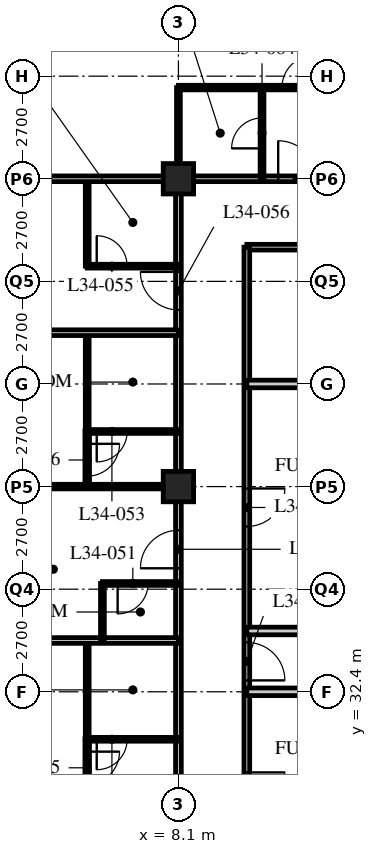
"""IFC4 building model, lengths in metres.
Left out: names, types, materials, properties, quantities, classifications, styles, units other than length and angle.
Written with IfcOpenShell. Run it as: python <this file> out.ifc"""

import sys

from ifc_helpers import new_model, si_unit, direction, frame, frame_2d, origin, origin_2d, place, context, subcontext, project, spatial, rectangle, hollow_rectangle, extrude, element, fill, save


model = new_model("IFC4")
c1 = context("Model", 3, precision=1e-05, world=origin(), true_north=direction((0.0, 1.0)))
c2 = subcontext(c1, "Body", "Model", "MODEL_VIEW")
j1 = project(units=[si_unit("LENGTHUNIT", "METRE"), si_unit("PLANEANGLEUNIT", "RADIAN")], contexts=[c1])
p1 = place(None, origin())
s1 = spatial("IfcSite", under=j1, at=p1, CompositionType="ELEMENT")
p2 = place(p1, origin())
s2 = spatial("IfcBuilding", under=s1, at=p2, CompositionType="ELEMENT")
p3 = place(p2, frame((0.0, 0.0, 134.0)))
s3 = spatial("IfcBuildingStorey", under=s2, at=p3, CompositionType="ELEMENT", Elevation=134.0)
for number, where, z_axis, x_axis in (
    (1, (8.1, 37.8, 0.0), (0.0, 0.0, 1.0), (1.0, 0.0, 0.0)),
    (2, (8.1, 45.9, 0.0), (0.0, 0.0, 1.0), (1.0, 0.0, 0.0)),
):
    element("IfcColumn", number, at=place(p3, frame(where, z_axis=z_axis, x_axis=x_axis)), inside=s3, PredefinedType="COLUMN", context=c2, shape_type="SweptSolid", body=[
        extrude(hollow_rectangle(XDim=0.8, YDim=0.8, WallThickness=0.08, at=origin_2d()), origin(), (0.0, 0.0, 1.0), 3.4),
    ])
p4 = place(p3, frame((8.1, 45.9, 0.0), z_axis=(0.0, 0.0, 1.0), x_axis=(1.0, 0.0, 0.0)))
e3 = element("IfcWall", 3, at=p4, inside=s3, PredefinedType="PARTITIONING", context=c2, shape_type="SweptSolid", body=[
    extrude(rectangle(XDim=36.45, YDim=0.15, at=frame_2d((18.225, 0.0))), origin(), (0.0, 0.0, 1.0), 2.578),
])
p5 = place(p4, frame((9.625, 0.0, 0.0)))
e4 = element("IfcOpeningElement", 4, at=p5, cuts=e3, PredefinedType="OPENING", context=c2, shape_type="SweptSolid", body=[
    extrude(rectangle(XDim=1.0, YDim=2.1, at=frame_2d((0.5, 1.05))), frame((0.0, 0.085, 0.0), z_axis=(0.0, -1.0, 0.0), x_axis=(1.0, 0.0, 0.0)), (0.0, 0.0, 1.0), 0.17),
])
p6 = place(p4, frame((21.775, 0.0, 0.0)))
e5 = element("IfcOpeningElement", 5, at=p6, cuts=e3, PredefinedType="OPENING", context=c2, shape_type="SweptSolid", body=[
    extrude(rectangle(XDim=1.0, YDim=2.1, at=frame_2d((0.5, 1.05))), frame((0.0, 0.085, 0.0), z_axis=(0.0, -1.0, 0.0), x_axis=(1.0, 0.0, 0.0)), (0.0, 0.0, 1.0), 0.17),
])
p7 = place(p4, frame((28.95, 0.0, 0.0)))
e6 = element("IfcOpeningElement", 6, at=p7, cuts=e3, PredefinedType="OPENING", context=c2, shape_type="SweptSolid", body=[
    extrude(rectangle(XDim=1.0, YDim=2.1, at=frame_2d((0.5, 1.05))), frame((0.0, 0.085, 0.0), z_axis=(0.0, -1.0, 0.0), x_axis=(1.0, 0.0, 0.0)), (0.0, 0.0, 1.0), 0.17),
])
p8 = place(p4, frame((33.925, 0.0, 0.0)))
e7 = element("IfcOpeningElement", 7, at=p8, cuts=e3, PredefinedType="OPENING", context=c2, shape_type="SweptSolid", body=[
    extrude(rectangle(XDim=1.0, YDim=2.1, at=frame_2d((0.5, 1.05))), frame((0.0, 0.085, 0.0), z_axis=(0.0, -1.0, 0.0), x_axis=(1.0, 0.0, 0.0)), (0.0, 0.0, 1.0), 0.17),
])
p9 = place(p4, frame((2.625, 0.0, 0.0)))
e8 = element("IfcOpeningElement", 8, at=p9, cuts=e3, PredefinedType="OPENING", context=c2, shape_type="SweptSolid", body=[
    extrude(rectangle(XDim=1.0, YDim=2.1, at=frame_2d((0.5, 1.05))), frame((0.0, 0.085, 0.0), z_axis=(0.0, -1.0, 0.0), x_axis=(1.0, 0.0, 0.0)), (0.0, 0.0, 1.0), 0.17),
])
p10 = place(p3, frame((8.1, 17.55, 0.0), z_axis=(0.0, 0.0, 1.0), x_axis=(0.0, 1.0, 0.0)))
e9 = element("IfcWall", 9, at=p10, inside=s3, PredefinedType="PARTITIONING", context=c2, shape_type="SweptSolid", body=[
    extrude(rectangle(XDim=28.35, YDim=0.15, at=frame_2d((14.175, 0.0))), origin(), (0.0, 0.0, 1.0), 2.578),
])
p11 = place(p10, frame((1.9, 0.0, 0.0)))
e10 = element("IfcOpeningElement", 10, at=p11, cuts=e9, PredefinedType="OPENING", context=c2, shape_type="SweptSolid", body=[
    extrude(rectangle(XDim=1.0, YDim=2.1, at=frame_2d((0.5, 1.05))), frame((0.0, 0.085, 0.0), z_axis=(0.0, -1.0, 0.0), x_axis=(1.0, 0.0, 0.0)), (0.0, 0.0, 1.0), 0.17),
])
p12 = place(p10, frame((10.0, 0.0, 0.0)))
e11 = element("IfcOpeningElement", 11, at=p12, cuts=e9, PredefinedType="OPENING", context=c2, shape_type="SweptSolid", body=[
    extrude(rectangle(XDim=1.0, YDim=2.1, at=frame_2d((0.5, 1.05))), frame((0.0, 0.085, 0.0), z_axis=(0.0, -1.0, 0.0), x_axis=(1.0, 0.0, 0.0)), (0.0, 0.0, 1.0), 0.17),
])
p13 = place(p10, frame((18.1, 0.0, 0.0)))
e12 = element("IfcOpeningElement", 12, at=p13, cuts=e9, PredefinedType="OPENING", context=c2, shape_type="SweptSolid", body=[
    extrude(rectangle(XDim=1.0, YDim=2.1, at=frame_2d((0.5, 1.05))), frame((0.0, 0.085, 0.0), z_axis=(0.0, -1.0, 0.0), x_axis=(1.0, 0.0, 0.0)), (0.0, 0.0, 1.0), 0.17),
])
p14 = place(p10, frame((24.9, 0.0, 0.0)))
e13 = element("IfcOpeningElement", 13, at=p14, cuts=e9, PredefinedType="OPENING", context=c2, shape_type="SweptSolid", body=[
    extrude(rectangle(XDim=1.0, YDim=2.1, at=frame_2d((0.5, 1.05))), frame((0.0, 0.085, 0.0), z_axis=(0.0, -1.0, 0.0), x_axis=(1.0, 0.0, 0.0)), (0.0, 0.0, 1.0), 0.17),
])
p15 = place(p3, frame((27.14, 44.1, 0.0), z_axis=(0.0, 0.0, 1.0), x_axis=(-1.0, 0.0, 0.0)))
e14 = element("IfcWall", 14, at=p15, inside=s3, PredefinedType="PARTITIONING", context=c2, shape_type="SweptSolid", body=[
    extrude(rectangle(XDim=17.24, YDim=0.15, at=frame_2d((8.62, 0.0))), origin(), (0.0, 0.0, 1.0), 3.19),
])
p16 = place(p15, frame((13.59, 0.0, 0.0)))
e15 = element("IfcOpeningElement", 15, at=p16, cuts=e14, PredefinedType="OPENING", context=c2, shape_type="SweptSolid", body=[
    extrude(rectangle(XDim=1.0, YDim=2.1, at=frame_2d((0.5, 1.05))), frame((0.0, 0.085, 0.0), z_axis=(0.0, -1.0, 0.0), x_axis=(1.0, 0.0, 0.0)), (0.0, 0.0, 1.0), 0.17),
])
p17 = place(p15, frame((9.051, 0.0, 0.0)))
e16 = element("IfcOpeningElement", 16, at=p17, cuts=e14, PredefinedType="OPENING", context=c2, shape_type="SweptSolid", body=[
    extrude(rectangle(XDim=1.0, YDim=2.1, at=frame_2d((0.5, 1.05))), frame((0.0, 0.085, 0.0), z_axis=(0.0, -1.0, 0.0), x_axis=(1.0, 0.0, 0.0)), (0.0, 0.0, 1.0), 0.17),
])
p18 = place(p15, frame((3.576, 0.0, 0.0)))
e17 = element("IfcOpeningElement", 17, at=p18, cuts=e14, PredefinedType="OPENING", context=c2, shape_type="SweptSolid", body=[
    extrude(rectangle(XDim=1.0, YDim=2.1, at=frame_2d((0.5, 1.05))), frame((0.0, 0.085, 0.0), z_axis=(0.0, -1.0, 0.0), x_axis=(1.0, 0.0, 0.0)), (0.0, 0.0, 1.0), 0.17),
])
p19 = place(p3, frame((9.9, 44.1, 0.0), z_axis=(0.0, 0.0, 1.0), x_axis=(0.0, -1.0, 0.0)))
e18 = element("IfcWall", 18, at=p19, inside=s3, PredefinedType="PARTITIONING", context=c2, shape_type="SweptSolid", body=[
    extrude(rectangle(XDim=24.75, YDim=0.15, at=frame_2d((12.375, 0.0))), origin(), (0.0, 0.0, 1.0), 3.19),
])
p20 = place(p19, frame((17.871, 0.0, 0.0)))
e19 = element("IfcOpeningElement", 19, at=p20, cuts=e18, PredefinedType="OPENING", context=c2, shape_type="SweptSolid", body=[
    extrude(rectangle(XDim=1.0, YDim=2.1, at=frame_2d((0.5, 1.05))), frame((0.0, 0.085, 0.0), z_axis=(0.0, -1.0, 0.0), x_axis=(1.0, 0.0, 0.0)), (0.0, 0.0, 1.0), 0.17),
])
p21 = place(p19, frame((13.821, 0.0, 0.0)))
e20 = element("IfcOpeningElement", 20, at=p21, cuts=e18, PredefinedType="OPENING", context=c2, shape_type="SweptSolid", body=[
    extrude(rectangle(XDim=1.0, YDim=2.1, at=frame_2d((0.5, 1.05))), frame((0.0, 0.085, 0.0), z_axis=(0.0, -1.0, 0.0), x_axis=(1.0, 0.0, 0.0)), (0.0, 0.0, 1.0), 0.17),
])
p22 = place(p19, frame((10.4, 0.0, 0.0)))
e21 = element("IfcOpeningElement", 21, at=p22, cuts=e18, PredefinedType="OPENING", context=c2, shape_type="SweptSolid", body=[
    extrude(rectangle(XDim=1.0, YDim=2.1, at=frame_2d((0.5, 1.05))), frame((0.0, 0.085, 0.0), z_axis=(0.0, -1.0, 0.0), x_axis=(1.0, 0.0, 0.0)), (0.0, 0.0, 1.0), 0.17),
])
p23 = place(p19, frame((6.35, 0.0, 0.0)))
e22 = element("IfcOpeningElement", 22, at=p23, cuts=e18, PredefinedType="OPENING", context=c2, shape_type="SweptSolid", body=[
    extrude(rectangle(XDim=1.0, YDim=2.1, at=frame_2d((0.5, 1.05))), frame((0.0, 0.085, 0.0), z_axis=(0.0, -1.0, 0.0), x_axis=(1.0, 0.0, 0.0)), (0.0, 0.0, 1.0), 0.17),
])
for number, where, z_axis, x_axis in (
    (23, (9.9, 32.4, 0.0), (0.0, 0.0, 1.0), (1.0, 0.0, 0.0)),
    (24, (9.9, 34.0, 0.0), (0.0, 0.0, 1.0), (1.0, 0.0, 0.0)),
    (25, (9.9, 40.5, 0.0), (0.0, 0.0, 1.0), (1.0, 0.0, 0.0)),
):
    element("IfcWall", number, at=place(p3, frame(where, z_axis=z_axis, x_axis=x_axis)), inside=s3, PredefinedType="SOLIDWALL", context=c2, shape_type="SweptSolid", body=[
        extrude(rectangle(XDim=6.3, YDim=0.2, at=frame_2d((3.15, 0.0))), origin(), (0.0, 0.0, 1.0), 3.19),
    ])
p24 = place(p3, frame((5.7, 31.15, 0.0), z_axis=(0.0, 0.0, 1.0), x_axis=(0.0, 1.0, 0.0)))
e26 = element("IfcWall", 26, at=p24, inside=s3, PredefinedType="PARTITIONING", context=c2, shape_type="SweptSolid", body=[
    extrude(rectangle(XDim=2.6, YDim=0.1, at=frame_2d((1.3, 0.0))), origin(), (0.0, 0.0, 1.0), 3.19),
])
p25 = place(p3, frame((8.1, 31.15, 0.0), z_axis=(0.0, 0.0, 1.0), x_axis=(-1.0, 0.0, 0.0)))
e27 = element("IfcWall", 27, at=p25, inside=s3, PredefinedType="PARTITIONING", context=c2, shape_type="SweptSolid", body=[
    extrude(rectangle(XDim=2.4, YDim=0.1, at=frame_2d((1.2, 0.0))), origin(), (0.0, 0.0, 1.0), 3.19),
])
p26 = place(p25, frame((1.35, 0.0, 0.0)))
e28 = element("IfcOpeningElement", 28, at=p26, cuts=e27, PredefinedType="OPENING", context=c2, shape_type="SweptSolid", body=[
    extrude(rectangle(XDim=0.8, YDim=2.1, at=frame_2d((0.4, 1.05))), frame((0.0, 0.06, 0.0), z_axis=(0.0, -1.0, 0.0), x_axis=(1.0, 0.0, 0.0)), (0.0, 0.0, 1.0), 0.12),
])
p27 = place(p3, frame((8.1, 33.75, 0.0), z_axis=(0.0, 0.0, 1.0), x_axis=(-1.0, 0.0, 0.0)))
e29 = element("IfcWall", 29, at=p27, inside=s3, PredefinedType="PARTITIONING", context=c2, shape_type="SweptSolid", body=[
    extrude(rectangle(XDim=7.8, YDim=0.15, at=frame_2d((3.9, 0.0))), origin(), (0.0, 0.0, 1.0), 3.19),
])
p28 = place(p3, frame((6.1, 33.75, 0.0), z_axis=(0.0, 0.0, 1.0), x_axis=(0.0, 1.0, 0.0)))
e30 = element("IfcWall", 30, at=p28, inside=s3, PredefinedType="PARTITIONING", context=c2, shape_type="SweptSolid", body=[
    extrude(rectangle(XDim=1.5, YDim=0.1, at=frame_2d((0.75, 0.0))), origin(), (0.0, 0.0, 1.0), 3.19),
])
p29 = place(p3, frame((8.1, 35.25, 0.0), z_axis=(0.0, 0.0, 1.0), x_axis=(-1.0, 0.0, 0.0)))
e31 = element("IfcWall", 31, at=p29, inside=s3, PredefinedType="PARTITIONING", context=c2, shape_type="SweptSolid", body=[
    extrude(rectangle(XDim=2.0, YDim=0.1, at=frame_2d((1.0, 0.0))), origin(), (0.0, 0.0, 1.0), 3.19),
])
p30 = place(p29, frame((0.8, 0.0, 0.0)))
e32 = element("IfcOpeningElement", 32, at=p30, cuts=e31, PredefinedType="OPENING", context=c2, shape_type="SweptSolid", body=[
    extrude(rectangle(XDim=0.8, YDim=2.1, at=frame_2d((0.4, 1.05))), frame((0.0, 0.06, 0.0), z_axis=(0.0, -1.0, 0.0), x_axis=(1.0, 0.0, 0.0)), (0.0, 0.0, 1.0), 0.12),
])
p31 = place(p3, frame((5.7, 39.25, 0.0), z_axis=(0.0, 0.0, 1.0), x_axis=(0.0, 1.0, 0.0)))
e33 = element("IfcWall", 33, at=p31, inside=s3, PredefinedType="PARTITIONING", context=c2, shape_type="SweptSolid", body=[
    extrude(rectangle(XDim=2.6, YDim=0.1, at=frame_2d((1.3, 0.0))), origin(), (0.0, 0.0, 1.0), 3.19),
])
p32 = place(p3, frame((8.1, 39.25, 0.0), z_axis=(0.0, 0.0, 1.0), x_axis=(-1.0, 0.0, 0.0)))
e34 = element("IfcWall", 34, at=p32, inside=s3, PredefinedType="PARTITIONING", context=c2, shape_type="SweptSolid", body=[
    extrude(rectangle(XDim=2.4, YDim=0.1, at=frame_2d((1.2, 0.0))), origin(), (0.0, 0.0, 1.0), 3.19),
])
p33 = place(p32, frame((1.35, 0.0, 0.0)))
e35 = element("IfcOpeningElement", 35, at=p33, cuts=e34, PredefinedType="OPENING", context=c2, shape_type="SweptSolid", body=[
    extrude(rectangle(XDim=0.8, YDim=2.1, at=frame_2d((0.4, 1.05))), frame((0.0, 0.06, 0.0), z_axis=(0.0, -1.0, 0.0), x_axis=(1.0, 0.0, 0.0)), (0.0, 0.0, 1.0), 0.12),
])
p34 = place(p3, frame((8.1, 37.8, 0.0), z_axis=(0.0, 0.0, 1.0), x_axis=(-1.0, 0.0, 0.0)))
e36 = element("IfcWall", 36, at=p34, inside=s3, PredefinedType="PARTITIONING", context=c2, shape_type="SweptSolid", body=[
    extrude(rectangle(XDim=7.8, YDim=0.12, at=frame_2d((3.9, 0.0))), origin(), (0.0, 0.0, 1.0), 2.578),
])
p35 = place(p34, frame((4.825, 0.0, 0.0)))
e37 = element("IfcOpeningElement", 37, at=p35, cuts=e36, PredefinedType="OPENING", context=c2, shape_type="SweptSolid", body=[
    extrude(rectangle(XDim=0.85, YDim=2.1, at=frame_2d((0.425, 1.05))), frame((0.0, 0.07, 0.0), z_axis=(0.0, -1.0, 0.0), x_axis=(1.0, 0.0, 0.0)), (0.0, 0.0, 1.0), 0.14),
])
p36 = place(p3, frame((8.1, 41.85, 0.0), z_axis=(0.0, 0.0, 1.0), x_axis=(-1.0, 0.0, 0.0)))
e38 = element("IfcWall", 38, at=p36, inside=s3, PredefinedType="PARTITIONING", context=c2, shape_type="SweptSolid", body=[
    extrude(rectangle(XDim=7.8, YDim=0.15, at=frame_2d((3.9, 0.0))), origin(), (0.0, 0.0, 1.0), 3.19),
])
p37 = place(p3, frame((5.7, 43.6, 0.0), z_axis=(0.0, 0.0, 1.0), x_axis=(0.0, 1.0, 0.0)))
e39 = element("IfcWall", 39, at=p37, inside=s3, PredefinedType="PARTITIONING", context=c2, shape_type="SweptSolid", body=[
    extrude(rectangle(XDim=2.3, YDim=0.1, at=frame_2d((1.15, 0.0))), origin(), (0.0, 0.0, 1.0), 3.19),
])
p38 = place(p3, frame((8.1, 43.6, 0.0), z_axis=(0.0, 0.0, 1.0), x_axis=(-1.0, 0.0, 0.0)))
e40 = element("IfcWall", 40, at=p38, inside=s3, PredefinedType="PARTITIONING", context=c2, shape_type="SweptSolid", body=[
    extrude(rectangle(XDim=2.4, YDim=0.1, at=frame_2d((1.2, 0.0))), origin(), (0.0, 0.0, 1.0), 3.19),
])
p39 = place(p38, frame((1.35, 0.0, 0.0)))
e41 = element("IfcOpeningElement", 41, at=p39, cuts=e40, PredefinedType="OPENING", context=c2, shape_type="SweptSolid", body=[
    extrude(rectangle(XDim=0.8, YDim=2.1, at=frame_2d((0.4, 1.05))), frame((0.0, 0.06, 0.0), z_axis=(0.0, -1.0, 0.0), x_axis=(1.0, 0.0, 0.0)), (0.0, 0.0, 1.0), 0.12),
])
p40 = place(p3, frame((8.1, 48.3, 0.0), z_axis=(0.0, 0.0, 1.0), x_axis=(1.0, 0.0, 0.0)))
e42 = element("IfcWall", 42, at=p40, inside=s3, PredefinedType="PARTITIONING", context=c2, shape_type="SweptSolid", body=[
    extrude(rectangle(XDim=4.05, YDim=0.12, at=frame_2d((2.025, 0.0))), origin(), (0.0, 0.0, 1.0), 3.19),
])
p41 = place(p40, frame((2.725, 0.0, 0.0)))
e43 = element("IfcOpeningElement", 43, at=p41, cuts=e42, PredefinedType="OPENING", context=c2, shape_type="SweptSolid", body=[
    extrude(rectangle(XDim=0.85, YDim=2.1, at=frame_2d((0.425, 1.05))), frame((0.0, 0.07, 0.0), z_axis=(0.0, -1.0, 0.0), x_axis=(1.0, 0.0, 0.0)), (0.0, 0.0, 1.0), 0.14),
])
p42 = place(p3, frame((10.3, 45.9, 0.0), z_axis=(0.0, 0.0, 1.0), x_axis=(0.0, 1.0, 0.0)))
e44 = element("IfcWall", 44, at=p42, inside=s3, PredefinedType="PARTITIONING", context=c2, shape_type="SweptSolid", body=[
    extrude(rectangle(XDim=2.4, YDim=0.1, at=frame_2d((1.2, 0.0))), origin(), (0.0, 0.0, 1.0), 3.19),
])
p43 = place(p42, frame((0.8, 0.0, 0.0)))
e45 = element("IfcOpeningElement", 45, at=p43, cuts=e44, PredefinedType="OPENING", context=c2, shape_type="SweptSolid", body=[
    extrude(rectangle(XDim=0.8, YDim=2.1, at=frame_2d((0.4, 1.05))), frame((0.0, 0.06, 0.0), z_axis=(0.0, -1.0, 0.0), x_axis=(1.0, 0.0, 0.0)), (0.0, 0.0, 1.0), 0.12),
])
p44 = place(p3, frame((8.1, 45.9, 0.0), z_axis=(0.0, 0.0, 1.0), x_axis=(0.0, 1.0, 0.0)))
e46 = element("IfcWall", 46, at=p44, inside=s3, PredefinedType="PARTITIONING", context=c2, shape_type="SweptSolid", body=[
    extrude(rectangle(XDim=2.4, YDim=0.1, at=frame_2d((1.2, 0.0))), origin(), (0.0, 0.0, 1.0), 2.578),
])
p45 = place(p3, frame((4.35, 45.9, 0.0), z_axis=(0.0, 0.0, 1.0), x_axis=(1.0, 0.0, 0.0)))
e47 = element("IfcWall", 47, at=p45, inside=s3, PredefinedType="PARTITIONING", context=c2, shape_type="SweptSolid", body=[
    extrude(rectangle(XDim=3.75, YDim=0.15, at=frame_2d((1.875, 0.0))), origin(), (0.0, 0.0, 1.0), 2.578),
])
p46 = place(p3, frame((5.7, 29.7, 0.0), z_axis=(0.0, 0.0, 1.0), x_axis=(0.0, 1.0, 0.0)))
e48 = element("IfcWall", 48, at=p46, inside=s3, PredefinedType="PARTITIONING", context=c2, shape_type="SweptSolid", body=[
    extrude(rectangle(XDim=1.46, YDim=0.12, at=frame_2d((0.73, 0.0))), origin(), (0.0, 0.0, 1.0), 3.19),
])
p47 = place(p46, frame((0.275, 0.0, 0.0)))
e49 = element("IfcOpeningElement", 49, at=p47, cuts=e48, PredefinedType="OPENING", context=c2, shape_type="SweptSolid", body=[
    extrude(rectangle(XDim=0.85, YDim=2.1, at=frame_2d((0.425, 1.05))), frame((0.0, 0.07, 0.0), z_axis=(0.0, -1.0, 0.0), x_axis=(1.0, 0.0, 0.0)), (0.0, 0.0, 1.0), 0.14),
])
p48 = place(p3, frame((5.7, 37.8, 0.0), z_axis=(0.0, 0.0, 1.0), x_axis=(0.0, 1.0, 0.0)))
e50 = element("IfcWall", 50, at=p48, inside=s3, PredefinedType="PARTITIONING", context=c2, shape_type="SweptSolid", body=[
    extrude(rectangle(XDim=1.46, YDim=0.12, at=frame_2d((0.73, 0.0))), origin(), (0.0, 0.0, 1.0), 3.19),
])
p49 = place(p48, frame((0.275, 0.0, 0.0)))
e51 = element("IfcOpeningElement", 51, at=p49, cuts=e50, PredefinedType="OPENING", context=c2, shape_type="SweptSolid", body=[
    extrude(rectangle(XDim=0.85, YDim=2.1, at=frame_2d((0.425, 1.05))), frame((0.0, 0.07, 0.0), z_axis=(0.0, -1.0, 0.0), x_axis=(1.0, 0.0, 0.0)), (0.0, 0.0, 1.0), 0.14),
])
p50 = place(p21, origin())
e52 = element("IfcDoor", 52, at=p50, inside=s3, OperationType="SINGLE_SWING_LEFT", PredefinedType="DOOR", context=c2, shape_type="SweptSolid", body=[
    extrude(rectangle(XDim=1.0, YDim=2.1, at=frame_2d((0.5, 1.05))), frame((0.0, 0.025, 0.0), z_axis=(0.0, -1.0, 0.0), x_axis=(1.0, 0.0, 0.0)), (0.0, 0.0, 1.0), 0.05),
])
fill(e20, e52)
p51 = place(p22, origin())
e53 = element("IfcDoor", 53, at=p51, inside=s3, OperationType="SINGLE_SWING_RIGHT", PredefinedType="DOOR", context=c2, shape_type="SweptSolid", body=[
    extrude(rectangle(XDim=1.0, YDim=2.1, at=frame_2d((0.5, 1.05))), frame((0.0, 0.025, 0.0), z_axis=(0.0, -1.0, 0.0), x_axis=(1.0, 0.0, 0.0)), (0.0, 0.0, 1.0), 0.05),
])
fill(e21, e53)
p52 = place(p23, origin())
e54 = element("IfcDoor", 54, at=p52, inside=s3, OperationType="SINGLE_SWING_LEFT", PredefinedType="DOOR", context=c2, shape_type="SweptSolid", body=[
    extrude(rectangle(XDim=1.0, YDim=2.1, at=frame_2d((0.5, 1.05))), frame((0.0, 0.025, 0.0), z_axis=(0.0, -1.0, 0.0), x_axis=(1.0, 0.0, 0.0)), (0.0, 0.0, 1.0), 0.05),
])
fill(e22, e54)
p53 = place(p26, origin())
e55 = element("IfcDoor", 55, at=p53, inside=s3, OperationType="SINGLE_SWING_RIGHT", PredefinedType="DOOR", context=c2, shape_type="SweptSolid", body=[
    extrude(rectangle(XDim=0.8, YDim=2.1, at=frame_2d((0.4, 1.05))), frame((0.0, 0.025, 0.0), z_axis=(0.0, -1.0, 0.0), x_axis=(1.0, 0.0, 0.0)), (0.0, 0.0, 1.0), 0.05),
])
fill(e28, e55)
p54 = place(p30, origin())
e56 = element("IfcDoor", 56, at=p54, inside=s3, OperationType="SINGLE_SWING_RIGHT", PredefinedType="DOOR", context=c2, shape_type="SweptSolid", body=[
    extrude(rectangle(XDim=0.8, YDim=2.1, at=frame_2d((0.4, 1.05))), frame((0.0, 0.025, 0.0), z_axis=(0.0, -1.0, 0.0), x_axis=(1.0, 0.0, 0.0)), (0.0, 0.0, 1.0), 0.05),
])
fill(e32, e56)
p55 = place(p13, origin())
e57 = element("IfcDoor", 57, at=p55, inside=s3, OperationType="SINGLE_SWING_LEFT", PredefinedType="DOOR", context=c2, shape_type="SweptSolid", body=[
    extrude(rectangle(XDim=1.0, YDim=2.1, at=frame_2d((0.5, 1.05))), frame((0.0, 0.025, 0.0), z_axis=(0.0, -1.0, 0.0), x_axis=(1.0, 0.0, 0.0)), (0.0, 0.0, 1.0), 0.05),
])
fill(e12, e57)
p56 = place(p33, origin())
e58 = element("IfcDoor", 58, at=p56, inside=s3, OperationType="SINGLE_SWING_RIGHT", PredefinedType="DOOR", context=c2, shape_type="SweptSolid", body=[
    extrude(rectangle(XDim=0.8, YDim=2.1, at=frame_2d((0.4, 1.05))), frame((0.0, 0.025, 0.0), z_axis=(0.0, -1.0, 0.0), x_axis=(1.0, 0.0, 0.0)), (0.0, 0.0, 1.0), 0.05),
])
fill(e35, e58)
p57 = place(p39, origin())
e59 = element("IfcDoor", 59, at=p57, inside=s3, OperationType="SINGLE_SWING_LEFT", PredefinedType="DOOR", context=c2, shape_type="SweptSolid", body=[
    extrude(rectangle(XDim=0.8, YDim=2.1, at=frame_2d((0.4, 1.05))), frame((0.0, 0.025, 0.0), z_axis=(0.0, -1.0, 0.0), x_axis=(1.0, 0.0, 0.0)), (0.0, 0.0, 1.0), 0.05),
])
fill(e41, e59)
p58 = place(p14, origin())
e60 = element("IfcDoor", 60, at=p58, inside=s3, OperationType="SINGLE_SWING_RIGHT", PredefinedType="DOOR", context=c2, shape_type="SweptSolid", body=[
    extrude(rectangle(XDim=1.0, YDim=2.1, at=frame_2d((0.5, 1.05))), frame((0.0, 0.025, 0.0), z_axis=(0.0, -1.0, 0.0), x_axis=(1.0, 0.0, 0.0)), (0.0, 0.0, 1.0), 0.05),
])
fill(e13, e60)
p59 = place(p43, origin())
e61 = element("IfcDoor", 61, at=p59, inside=s3, OperationType="SINGLE_SWING_LEFT", PredefinedType="DOOR", context=c2, shape_type="SweptSolid", body=[
    extrude(rectangle(XDim=0.8, YDim=2.1, at=frame_2d((0.4, 1.05))), frame((0.0, 0.025, 0.0), z_axis=(0.0, -1.0, 0.0), x_axis=(1.0, 0.0, 0.0)), (0.0, 0.0, 1.0), 0.05),
])
fill(e45, e61)
p60 = place(p9, origin())
e62 = element("IfcDoor", 62, at=p60, inside=s3, OperationType="SINGLE_SWING_LEFT", PredefinedType="DOOR", context=c2, shape_type="SweptSolid", body=[
    extrude(rectangle(XDim=1.0, YDim=2.1, at=frame_2d((0.5, 1.05))), frame((0.0, 0.025, 0.0), z_axis=(0.0, -1.0, 0.0), x_axis=(1.0, 0.0, 0.0)), (0.0, 0.0, 1.0), 0.05),
])
fill(e8, e62)
p61 = place(p41, origin())
e63 = element("IfcDoor", 63, at=p61, inside=s3, OperationType="SINGLE_SWING_RIGHT", PredefinedType="DOOR", context=c2, shape_type="SweptSolid", body=[
    extrude(rectangle(XDim=0.85, YDim=2.1, at=frame_2d((0.425, 1.05))), frame((0.0, 0.025, 0.0), z_axis=(0.0, -1.0, 0.0), x_axis=(1.0, 0.0, 0.0)), (0.0, 0.0, 1.0), 0.05),
])
fill(e43, e63)
p62 = place(p47, origin())
e64 = element("IfcDoor", 64, at=p62, inside=s3, OperationType="SINGLE_SWING_LEFT", PredefinedType="DOOR", context=c2, shape_type="SweptSolid", body=[
    extrude(rectangle(XDim=0.85, YDim=2.1, at=frame_2d((0.425, 1.05))), frame((0.0, 0.025, 0.0), z_axis=(0.0, -1.0, 0.0), x_axis=(1.0, 0.0, 0.0)), (0.0, 0.0, 1.0), 0.05),
])
fill(e49, e64)
p63 = place(p49, origin())
e65 = element("IfcDoor", 65, at=p63, inside=s3, OperationType="SINGLE_SWING_LEFT", PredefinedType="DOOR", context=c2, shape_type="SweptSolid", body=[
    extrude(rectangle(XDim=0.85, YDim=2.1, at=frame_2d((0.425, 1.05))), frame((0.0, 0.025, 0.0), z_axis=(0.0, -1.0, 0.0), x_axis=(1.0, 0.0, 0.0)), (0.0, 0.0, 1.0), 0.05),
])
fill(e51, e65)
save(model, sys.argv[1])
